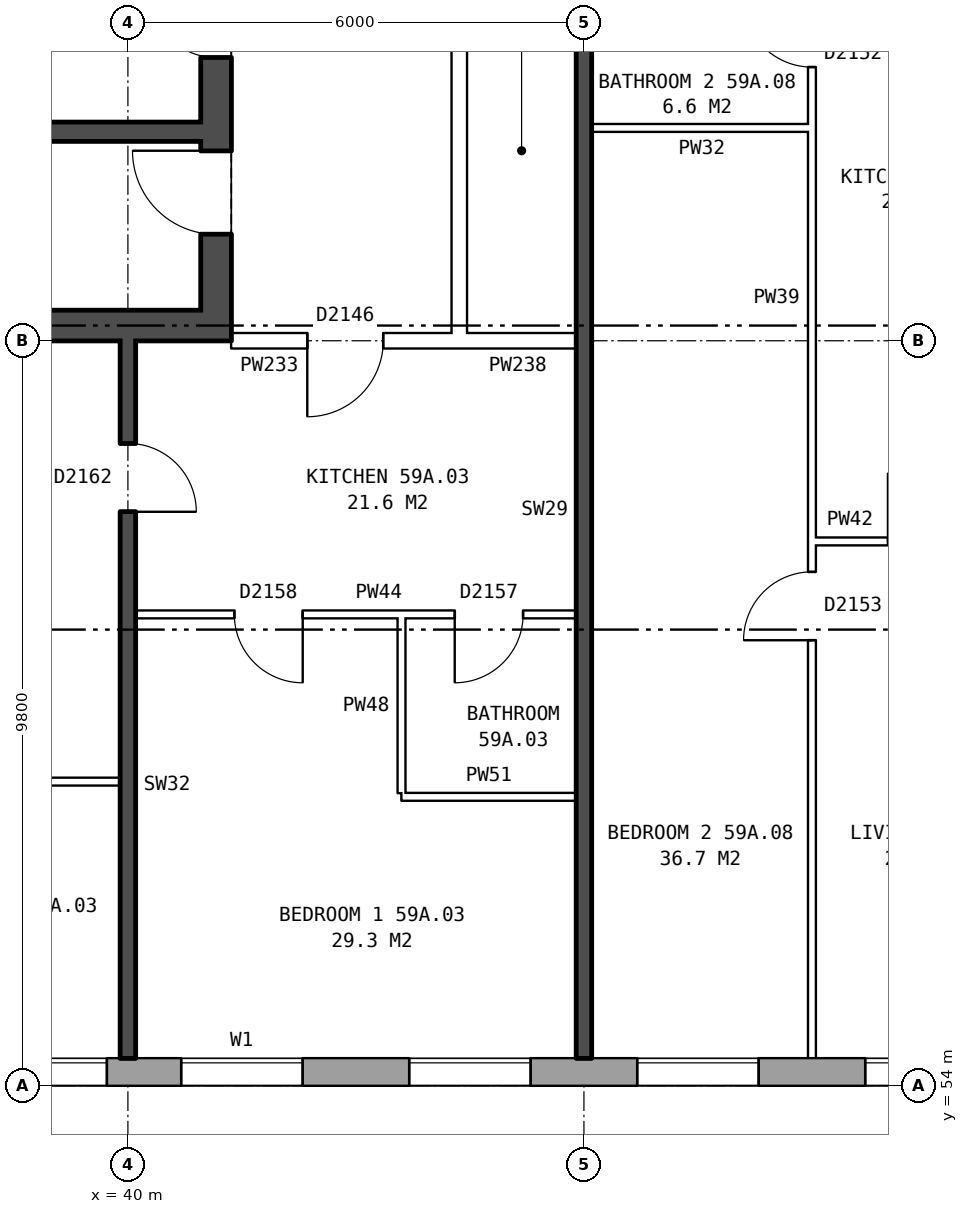
"""IFC4 building model, lengths in metres.
Left out: names, types, materials, properties, quantities, classifications, styles, units other than length and angle.
Written with IfcOpenShell. Run it as: python <this file> out.ifc"""

import sys

from ifc_helpers import new_model, si_unit, direction, frame, frame_2d, origin, place, context, subcontext, project, spatial, rectangle, extrude, element, fill, save


model = new_model("IFC4")
c1 = context("Model", 3, precision=1e-05, world=origin(), true_north=direction((0.0, 1.0)))
c2 = subcontext(c1, "Body", "Model", "MODEL_VIEW")
j1 = project(units=[si_unit("LENGTHUNIT", "METRE"), si_unit("PLANEANGLEUNIT", "RADIAN")], contexts=[c1])
p1 = place(None, origin())
s1 = spatial("IfcSite", under=j1, at=p1, CompositionType="ELEMENT")
p2 = place(p1, origin())
s2 = spatial("IfcBuilding", under=s1, at=p2, CompositionType="ELEMENT")
p3 = place(p2, frame((0.0, 0.0, 209.0)))
s3 = spatial("IfcBuildingStorey", under=s2, at=p3, CompositionType="ELEMENT", Elevation=209.0)
p4 = place(p3, frame((35.075, 54.18, 0.0), z_axis=(0.0, 0.0, 1.0), x_axis=(1.0, 0.0, 0.0)))
e1 = element("IfcWall", 1, at=p4, inside=s3, PredefinedType="STANDARD", context=c2, shape_type="SweptSolid", body=[
    extrude(rectangle(XDim=39.875, YDim=0.36, at=frame_2d((19.938, 0.0))), origin(), (0.0, 0.0, 1.0), 2.85),
])
p5 = place(p4, frame((0.3, 0.0, 0.8)))
e2 = element("IfcOpeningElement", 2, at=p5, cuts=e1, PredefinedType="OPENING", context=c2, shape_type="SweptSolid", body=[
    extrude(rectangle(XDim=1.0, YDim=1.8, at=frame_2d((0.5, 0.9))), frame((0.0, 0.19, 0.0), z_axis=(0.0, -1.0, 0.0), x_axis=(1.0, 0.0, 0.0)), (0.0, 0.0, 1.0), 0.38),
])
p6 = place(p4, frame((5.625, 0.0, 0.8)))
e3 = element("IfcOpeningElement", 3, at=p6, cuts=e1, PredefinedType="OPENING", context=c2, shape_type="SweptSolid", body=[
    extrude(rectangle(XDim=1.6, YDim=1.8, at=frame_2d((0.8, 0.9))), frame((0.0, 0.19, 0.0), z_axis=(0.0, -1.0, 0.0), x_axis=(1.0, 0.0, 0.0)), (0.0, 0.0, 1.0), 0.38),
])
p7 = place(p4, frame((8.625, 0.0, 0.8)))
e4 = element("IfcOpeningElement", 4, at=p7, cuts=e1, PredefinedType="OPENING", context=c2, shape_type="SweptSolid", body=[
    extrude(rectangle(XDim=1.6, YDim=1.8, at=frame_2d((0.8, 0.9))), frame((0.0, 0.19, 0.0), z_axis=(0.0, -1.0, 0.0), x_axis=(1.0, 0.0, 0.0)), (0.0, 0.0, 1.0), 0.38),
])
p8 = place(p4, frame((11.625, 0.0, 0.8)))
e5 = element("IfcOpeningElement", 5, at=p8, cuts=e1, PredefinedType="OPENING", context=c2, shape_type="SweptSolid", body=[
    extrude(rectangle(XDim=1.6, YDim=1.8, at=frame_2d((0.8, 0.9))), frame((0.0, 0.19, 0.0), z_axis=(0.0, -1.0, 0.0), x_axis=(1.0, 0.0, 0.0)), (0.0, 0.0, 1.0), 0.38),
])
p9 = place(p4, frame((14.625, 0.0, 0.8)))
e6 = element("IfcOpeningElement", 6, at=p9, cuts=e1, PredefinedType="OPENING", context=c2, shape_type="SweptSolid", body=[
    extrude(rectangle(XDim=1.6, YDim=1.8, at=frame_2d((0.8, 0.9))), frame((0.0, 0.19, 0.0), z_axis=(0.0, -1.0, 0.0), x_axis=(1.0, 0.0, 0.0)), (0.0, 0.0, 1.0), 0.38),
])
p10 = place(p4, frame((17.625, 0.0, 0.8)))
e7 = element("IfcOpeningElement", 7, at=p10, cuts=e1, PredefinedType="OPENING", context=c2, shape_type="SweptSolid", body=[
    extrude(rectangle(XDim=1.6, YDim=1.8, at=frame_2d((0.8, 0.9))), frame((0.0, 0.19, 0.0), z_axis=(0.0, -1.0, 0.0), x_axis=(1.0, 0.0, 0.0)), (0.0, 0.0, 1.0), 0.38),
])
p11 = place(p4, frame((20.625, 0.0, 0.8)))
e8 = element("IfcOpeningElement", 8, at=p11, cuts=e1, PredefinedType="OPENING", context=c2, shape_type="SweptSolid", body=[
    extrude(rectangle(XDim=1.6, YDim=1.8, at=frame_2d((0.8, 0.9))), frame((0.0, 0.19, 0.0), z_axis=(0.0, -1.0, 0.0), x_axis=(1.0, 0.0, 0.0)), (0.0, 0.0, 1.0), 0.38),
])
p12 = place(p4, frame((23.625, 0.0, 0.8)))
e9 = element("IfcOpeningElement", 9, at=p12, cuts=e1, PredefinedType="OPENING", context=c2, shape_type="SweptSolid", body=[
    extrude(rectangle(XDim=1.6, YDim=1.8, at=frame_2d((0.8, 0.9))), frame((0.0, 0.19, 0.0), z_axis=(0.0, -1.0, 0.0), x_axis=(1.0, 0.0, 0.0)), (0.0, 0.0, 1.0), 0.38),
])
p13 = place(p4, frame((26.625, 0.0, 0.8)))
e10 = element("IfcOpeningElement", 10, at=p13, cuts=e1, PredefinedType="OPENING", context=c2, shape_type="SweptSolid", body=[
    extrude(rectangle(XDim=1.6, YDim=1.8, at=frame_2d((0.8, 0.9))), frame((0.0, 0.19, 0.0), z_axis=(0.0, -1.0, 0.0), x_axis=(1.0, 0.0, 0.0)), (0.0, 0.0, 1.0), 0.38),
])
p14 = place(p4, frame((29.625, 0.0, 0.8)))
e11 = element("IfcOpeningElement", 11, at=p14, cuts=e1, PredefinedType="OPENING", context=c2, shape_type="SweptSolid", body=[
    extrude(rectangle(XDim=1.6, YDim=1.8, at=frame_2d((0.8, 0.9))), frame((0.0, 0.19, 0.0), z_axis=(0.0, -1.0, 0.0), x_axis=(1.0, 0.0, 0.0)), (0.0, 0.0, 1.0), 0.38),
])
p15 = place(p4, frame((32.625, 0.0, 0.8)))
e12 = element("IfcOpeningElement", 12, at=p15, cuts=e1, PredefinedType="OPENING", context=c2, shape_type="SweptSolid", body=[
    extrude(rectangle(XDim=1.6, YDim=1.8, at=frame_2d((0.8, 0.9))), frame((0.0, 0.19, 0.0), z_axis=(0.0, -1.0, 0.0), x_axis=(1.0, 0.0, 0.0)), (0.0, 0.0, 1.0), 0.38),
])
p16 = place(p4, frame((36.325, 0.0, 1.1)))
e13 = element("IfcOpeningElement", 13, at=p16, cuts=e1, PredefinedType="OPENING", context=c2, shape_type="SweptSolid", body=[
    extrude(rectangle(XDim=0.8, YDim=1.5, at=frame_2d((0.4, 0.75))), frame((0.0, 0.19, 0.0), z_axis=(0.0, -1.0, 0.0), x_axis=(1.0, 0.0, 0.0)), (0.0, 0.0, 1.0), 0.38),
])
p17 = place(p4, frame((3.65, 0.0, 0.8)))
e14 = element("IfcOpeningElement", 14, at=p17, cuts=e1, PredefinedType="OPENING", context=c2, shape_type="SweptSolid", body=[
    extrude(rectangle(XDim=1.0, YDim=1.8, at=frame_2d((0.5, 0.9))), frame((0.0, 0.19, 0.0), z_axis=(0.0, -1.0, 0.0), x_axis=(1.0, 0.0, 0.0)), (0.0, 0.0, 1.0), 0.38),
])
p18 = place(p4, frame((37.425, 0.0, 0.8)))
e15 = element("IfcOpeningElement", 15, at=p18, cuts=e1, PredefinedType="OPENING", context=c2, shape_type="SweptSolid", body=[
    extrude(rectangle(XDim=1.4, YDim=1.8, at=frame_2d((0.7, 0.9))), frame((0.0, 0.19, 0.0), z_axis=(0.0, -1.0, 0.0), x_axis=(1.0, 0.0, 0.0)), (0.0, 0.0, 1.0), 0.38),
])
p19 = place(p3, frame((41.16, 76.2, 0.0), z_axis=(0.0, 0.0, 1.0), x_axis=(0.0, -1.0, 0.0)))
e16 = element("IfcWall", 16, at=p19, inside=s3, PredefinedType="SHEAR", context=c2, shape_type="SweptSolid", body=[
    extrude(rectangle(XDim=12.4, YDim=0.4, at=frame_2d((6.2, 0.0))), origin(), (0.0, 0.0, 1.0), 2.85),
])
p20 = place(p19, frame((1.325, 0.0, 0.0)))
e17 = element("IfcOpeningElement", 17, at=p20, cuts=e16, PredefinedType="OPENING", context=c2, shape_type="SweptSolid", body=[
    extrude(rectangle(XDim=1.1, YDim=2.1, at=frame_2d((0.55, 1.05))), frame((0.0, 0.21, 0.0), z_axis=(0.0, -1.0, 0.0), x_axis=(1.0, 0.0, 0.0)), (0.0, 0.0, 1.0), 0.42),
])
p21 = place(p19, frame((4.575, 0.0, 0.0)))
e18 = element("IfcOpeningElement", 18, at=p21, cuts=e16, PredefinedType="OPENING", context=c2, shape_type="SweptSolid", body=[
    extrude(rectangle(XDim=0.85, YDim=2.1, at=frame_2d((0.425, 1.05))), frame((0.0, 0.21, 0.0), z_axis=(0.0, -1.0, 0.0), x_axis=(1.0, 0.0, 0.0)), (0.0, 0.0, 1.0), 0.42),
])
p22 = place(p19, frame((7.825, 0.0, 0.0)))
e19 = element("IfcOpeningElement", 19, at=p22, cuts=e16, PredefinedType="OPENING", context=c2, shape_type="SweptSolid", body=[
    extrude(rectangle(XDim=0.85, YDim=2.1, at=frame_2d((0.425, 1.05))), frame((0.0, 0.21, 0.0), z_axis=(0.0, -1.0, 0.0), x_axis=(1.0, 0.0, 0.0)), (0.0, 0.0, 1.0), 0.42),
])
p23 = place(p19, frame((9.9, 0.0, 0.0)))
e20 = element("IfcOpeningElement", 20, at=p23, cuts=e16, PredefinedType="OPENING", context=c2, shape_type="SweptSolid", body=[
    extrude(rectangle(XDim=1.1, YDim=2.1, at=frame_2d((0.55, 1.05))), frame((0.0, 0.21, 0.0), z_axis=(0.0, -1.0, 0.0), x_axis=(1.0, 0.0, 0.0)), (0.0, 0.0, 1.0), 0.42),
])
p24 = place(p3, frame((40.96, 64.0, 0.0), z_axis=(0.0, 0.0, 1.0), x_axis=(-1.0, 0.0, 0.0)))
e21 = element("IfcWall", 21, at=p24, inside=s3, PredefinedType="SHEAR", context=c2, shape_type="SweptSolid", body=[
    extrude(rectangle(XDim=8.2, YDim=0.4, at=frame_2d((4.1, 0.0))), origin(), (0.0, 0.0, 1.0), 2.85),
])
p25 = place(p3, frame((40.96, 66.55, 0.0), z_axis=(0.0, 0.0, 1.0), x_axis=(-1.0, 0.0, 0.0)))
e22 = element("IfcWall", 22, at=p25, inside=s3, PredefinedType="SHEAR", context=c2, shape_type="SweptSolid", body=[
    extrude(rectangle(XDim=2.525, YDim=0.25, at=frame_2d((1.262, 0.0))), origin(), (0.0, 0.0, 1.0), 2.85),
])
p26 = place(p3, frame((44.36, 63.9, 0.0), z_axis=(0.0, 0.0, 1.0), x_axis=(0.0, 1.0, 0.0)))
e23 = element("IfcWall", 23, at=p26, inside=s3, PredefinedType="PARTITIONING", context=c2, shape_type="SweptSolid", body=[
    extrude(rectangle(XDim=12.2, YDim=0.2, at=frame_2d((6.1, 0.0))), origin(), (0.0, 0.0, 1.0), 2.85),
])
p27 = place(p26, frame((5.1, 0.0, 0.0)))
e24 = element("IfcOpeningElement", 24, at=p27, cuts=e23, PredefinedType="OPENING", context=c2, shape_type="SweptSolid", body=[
    extrude(rectangle(XDim=2.0, YDim=2.1, at=frame_2d((1.0, 1.05))), frame((0.0, 0.11, 0.0), z_axis=(0.0, -1.0, 0.0), x_axis=(1.0, 0.0, 0.0)), (0.0, 0.0, 1.0), 0.22),
])
p28 = place(p3, frame((43.6, 57.8, 0.0), z_axis=(0.0, 0.0, 1.0), x_axis=(1.0, 0.0, 0.0)))
e25 = element("IfcWall", 25, at=p28, inside=s3, PredefinedType="PARTITIONING", context=c2, shape_type="SweptSolid", body=[
    extrude(rectangle(XDim=2.3, YDim=0.1, at=frame_2d((1.15, 0.0))), origin(), (0.0, 0.0, 1.0), 2.85),
])
p29 = place(p3, frame((32.36, 58.0, 0.0), z_axis=(0.0, 0.0, 1.0), x_axis=(1.0, 0.0, 0.0)))
e26 = element("IfcWall", 26, at=p29, inside=s3, PredefinedType="PARTITIONING", context=c2, shape_type="SweptSolid", body=[
    extrude(rectangle(XDim=7.54, YDim=0.1, at=frame_2d((3.77, 0.0))), origin(), (0.0, 0.0, 1.0), 2.85),
])
p30 = place(p29, frame((3.32, 0.0, 0.0)))
e27 = element("IfcOpeningElement", 27, at=p30, cuts=e26, PredefinedType="OPENING", context=c2, shape_type="SweptSolid", body=[
    extrude(rectangle(XDim=0.9, YDim=2.1, at=frame_2d((0.45, 1.05))), frame((0.0, 0.06, 0.0), z_axis=(0.0, -1.0, 0.0), x_axis=(1.0, 0.0, 0.0)), (0.0, 0.0, 1.0), 0.12),
])
p31 = place(p3, frame((40.1, 60.2, 0.0), z_axis=(0.0, 0.0, 1.0), x_axis=(1.0, 0.0, 0.0)))
e28 = element("IfcWall", 28, at=p31, inside=s3, PredefinedType="PARTITIONING", context=c2, shape_type="SweptSolid", body=[
    extrude(rectangle(XDim=5.8, YDim=0.1, at=frame_2d((2.9, 0.0))), origin(), (0.0, 0.0, 1.0), 2.85),
])
p32 = place(p31, frame((1.3, 0.0, 0.0)))
e29 = element("IfcOpeningElement", 29, at=p32, cuts=e28, PredefinedType="OPENING", context=c2, shape_type="SweptSolid", body=[
    extrude(rectangle(XDim=0.9, YDim=2.1, at=frame_2d((0.45, 1.05))), frame((0.0, 0.06, 0.0), z_axis=(0.0, -1.0, 0.0), x_axis=(1.0, 0.0, 0.0)), (0.0, 0.0, 1.0), 0.12),
])
p33 = place(p31, frame((4.2, 0.0, 0.0)))
e30 = element("IfcOpeningElement", 30, at=p33, cuts=e28, PredefinedType="OPENING", context=c2, shape_type="SweptSolid", body=[
    extrude(rectangle(XDim=0.9, YDim=2.1, at=frame_2d((0.45, 1.05))), frame((0.0, 0.06, 0.0), z_axis=(0.0, -1.0, 0.0), x_axis=(1.0, 0.0, 0.0)), (0.0, 0.0, 1.0), 0.12),
])
p34 = place(p3, frame((49.0, 61.16, 0.0), z_axis=(0.0, 0.0, 1.0), x_axis=(1.0, 0.0, 0.0)))
e31 = element("IfcWall", 31, at=p34, inside=s3, PredefinedType="PARTITIONING", context=c2, shape_type="SweptSolid", body=[
    extrude(rectangle(XDim=2.9, YDim=0.1, at=frame_2d((1.45, 0.0))), origin(), (0.0, 0.0, 1.0), 2.85),
])
p35 = place(p34, frame((1.0, 0.0, 0.0)))
e32 = element("IfcOpeningElement", 32, at=p35, cuts=e31, PredefinedType="OPENING", context=c2, shape_type="SweptSolid", body=[
    extrude(rectangle(XDim=0.9, YDim=2.1, at=frame_2d((0.45, 1.05))), frame((0.0, 0.06, 0.0), z_axis=(0.0, -1.0, 0.0), x_axis=(1.0, 0.0, 0.0)), (0.0, 0.0, 1.0), 0.12),
])
p36 = place(p3, frame((41.36, 63.8, 0.0), z_axis=(0.0, 0.0, 1.0), x_axis=(1.0, 0.0, 0.0)))
e33 = element("IfcWall", 33, at=p36, inside=s3, PredefinedType="PARTITIONING", context=c2, shape_type="SweptSolid", body=[
    extrude(rectangle(XDim=3.0, YDim=0.2, at=frame_2d((1.5, 0.0))), origin(), (0.0, 0.0, 1.0), 2.85),
])
p37 = place(p36, frame((1.0, 0.0, 0.0)))
e34 = element("IfcOpeningElement", 34, at=p37, cuts=e33, PredefinedType="OPENING", context=c2, shape_type="SweptSolid", body=[
    extrude(rectangle(XDim=1.0, YDim=2.1, at=frame_2d((0.5, 1.05))), frame((0.0, 0.11, 0.0), z_axis=(0.0, -1.0, 0.0), x_axis=(1.0, 0.0, 0.0)), (0.0, 0.0, 1.0), 0.22),
])
p38 = place(p3, frame((44.36, 63.8, 0.0), z_axis=(0.0, 0.0, 1.0), x_axis=(1.0, 0.0, 0.0)))
e35 = element("IfcWall", 35, at=p38, inside=s3, PredefinedType="PARTITIONING", context=c2, shape_type="SweptSolid", body=[
    extrude(rectangle(XDim=1.54, YDim=0.2, at=frame_2d((0.77, 0.0))), origin(), (0.0, 0.0, 1.0), 2.85),
])
p39 = place(p3, frame((46.1, 66.6, 0.0), z_axis=(0.0, 0.0, 1.0), x_axis=(1.0, 0.0, 0.0)))
e36 = element("IfcWall", 36, at=p39, inside=s3, PredefinedType="PARTITIONING", context=c2, shape_type="SweptSolid", body=[
    extrude(rectangle(XDim=2.9, YDim=0.1, at=frame_2d((1.45, 0.0))), origin(), (0.0, 0.0, 1.0), 2.85),
])
p40 = place(p3, frame((40.0, 54.36, 0.0), z_axis=(0.0, 0.0, 1.0), x_axis=(0.0, 1.0, 0.0)))
e37 = element("IfcWall", 37, at=p40, inside=s3, PredefinedType="SOLIDWALL", context=c2, shape_type="SweptSolid", body=[
    extrude(rectangle(XDim=9.44, YDim=0.2, at=frame_2d((4.72, 0.0))), origin(), (0.0, 0.0, 1.0), 2.85),
])
p41 = place(p40, frame((7.19, 0.0, 0.0)))
e38 = element("IfcOpeningElement", 38, at=p41, cuts=e37, PredefinedType="OPENING", context=c2, shape_type="SweptSolid", body=[
    extrude(rectangle(XDim=0.9, YDim=2.1, at=frame_2d((0.45, 1.05))), frame((0.0, 0.11, 0.0), z_axis=(0.0, -1.0, 0.0), x_axis=(1.0, 0.0, 0.0)), (0.0, 0.0, 1.0), 0.22),
])
p42 = place(p3, frame((43.6, 57.85, 0.0), z_axis=(0.0, 0.0, 1.0), x_axis=(0.0, 1.0, 0.0)))
e39 = element("IfcWall", 39, at=p42, inside=s3, PredefinedType="PARTITIONING", context=c2, shape_type="SweptSolid", body=[
    extrude(rectangle(XDim=2.3, YDim=0.1, at=frame_2d((1.15, 0.0))), origin(), (0.0, 0.0, 1.0), 2.85),
])
p43 = place(p3, frame((46.0, 54.36, 0.0), z_axis=(0.0, 0.0, 1.0), x_axis=(0.0, 1.0, 0.0)))
e40 = element("IfcWall", 40, at=p43, inside=s3, PredefinedType="SOLIDWALL", context=c2, shape_type="SweptSolid", body=[
    extrude(rectangle(XDim=14.44, YDim=0.2, at=frame_2d((7.22, 0.0))), origin(), (0.0, 0.0, 1.0), 2.85),
])
p44 = place(p3, frame((49.0, 54.36, 0.0), z_axis=(0.0, 0.0, 1.0), x_axis=(0.0, 1.0, 0.0)))
e41 = element("IfcWall", 41, at=p44, inside=s3, PredefinedType="PARTITIONING", context=c2, shape_type="SweptSolid", body=[
    extrude(rectangle(XDim=14.34, YDim=0.1, at=frame_2d((7.17, 0.0))), origin(), (0.0, 0.0, 1.0), 2.85),
])
p45 = place(p44, frame((5.5, 0.0, 0.0)))
e42 = element("IfcOpeningElement", 42, at=p45, cuts=e41, PredefinedType="OPENING", context=c2, shape_type="SweptSolid", body=[
    extrude(rectangle(XDim=0.9, YDim=2.1, at=frame_2d((0.45, 1.05))), frame((0.0, 0.06, 0.0), z_axis=(0.0, -1.0, 0.0), x_axis=(1.0, 0.0, 0.0)), (0.0, 0.0, 1.0), 0.12),
])
p46 = place(p44, frame((13.04, 0.0, 0.0)))
e43 = element("IfcOpeningElement", 43, at=p46, cuts=e41, PredefinedType="OPENING", context=c2, shape_type="SweptSolid", body=[
    extrude(rectangle(XDim=0.9, YDim=2.1, at=frame_2d((0.45, 1.05))), frame((0.0, 0.06, 0.0), z_axis=(0.0, -1.0, 0.0), x_axis=(1.0, 0.0, 0.0)), (0.0, 0.0, 1.0), 0.12),
])
p47 = place(p6, origin())
e44 = element("IfcWindow", 44, at=p47, inside=s3, PartitioningType="SINGLE_PANEL", PredefinedType="WINDOW", context=c2, shape_type="SweptSolid", body=[
    extrude(rectangle(XDim=1.6, YDim=1.8, at=frame_2d((0.8, 0.9))), frame((0.0, 0.15, 0.0), z_axis=(0.0, -1.0, 0.0), x_axis=(1.0, 0.0, 0.0)), (0.0, 0.0, 1.0), 0.06),
])
fill(e3, e44)
p48 = place(p7, origin())
e45 = element("IfcWindow", 45, at=p48, inside=s3, PartitioningType="SINGLE_PANEL", PredefinedType="WINDOW", context=c2, shape_type="SweptSolid", body=[
    extrude(rectangle(XDim=1.6, YDim=1.8, at=frame_2d((0.8, 0.9))), frame((0.0, 0.15, 0.0), z_axis=(0.0, -1.0, 0.0), x_axis=(1.0, 0.0, 0.0)), (0.0, 0.0, 1.0), 0.06),
])
fill(e4, e45)
p49 = place(p8, origin())
e46 = element("IfcWindow", 46, at=p49, inside=s3, PartitioningType="SINGLE_PANEL", PredefinedType="WINDOW", context=c2, shape_type="SweptSolid", body=[
    extrude(rectangle(XDim=1.6, YDim=1.8, at=frame_2d((0.8, 0.9))), frame((0.0, 0.15, 0.0), z_axis=(0.0, -1.0, 0.0), x_axis=(1.0, 0.0, 0.0)), (0.0, 0.0, 1.0), 0.06),
])
fill(e5, e46)
p50 = place(p9, origin())
e47 = element("IfcWindow", 47, at=p50, inside=s3, PartitioningType="SINGLE_PANEL", PredefinedType="WINDOW", context=c2, shape_type="SweptSolid", body=[
    extrude(rectangle(XDim=1.6, YDim=1.8, at=frame_2d((0.8, 0.9))), frame((0.0, 0.15, 0.0), z_axis=(0.0, -1.0, 0.0), x_axis=(1.0, 0.0, 0.0)), (0.0, 0.0, 1.0), 0.06),
])
fill(e6, e47)
p51 = place(p22, frame((0.85, 0.0, 0.0), z_axis=(0.0, 0.0, 1.0), x_axis=(-1.0, 0.0, 0.0)))
e48 = element("IfcDoor", 48, at=p51, inside=s3, OperationType="SINGLE_SWING_RIGHT", PredefinedType="DOOR", context=c2, shape_type="SweptSolid", body=[
    extrude(rectangle(XDim=0.85, YDim=2.1, at=frame_2d((0.425, 1.05))), frame((0.0, 0.185, 0.0), z_axis=(0.0, -1.0, 0.0), x_axis=(1.0, 0.0, 0.0)), (0.0, 0.0, 1.0), 0.05),
])
fill(e19, e48)
p52 = place(p23, frame((1.1, 0.0, 0.0), z_axis=(0.0, 0.0, 1.0), x_axis=(-1.0, 0.0, 0.0)))
e49 = element("IfcDoor", 49, at=p52, inside=s3, OperationType="SINGLE_SWING_RIGHT", PredefinedType="DOOR", context=c2, shape_type="SweptSolid", body=[
    extrude(rectangle(XDim=1.1, YDim=2.1, at=frame_2d((0.55, 1.05))), frame((0.0, 0.185, 0.0), z_axis=(0.0, -1.0, 0.0), x_axis=(1.0, 0.0, 0.0)), (0.0, 0.0, 1.0), 0.05),
])
fill(e20, e49)
p53 = place(p32, frame((0.9, 0.0, 0.0), z_axis=(0.0, 0.0, 1.0), x_axis=(-1.0, 0.0, 0.0)))
e50 = element("IfcDoor", 50, at=p53, inside=s3, OperationType="SINGLE_SWING_LEFT", PredefinedType="DOOR", context=c2, shape_type="SweptSolid", body=[
    extrude(rectangle(XDim=0.9, YDim=2.1, at=frame_2d((0.45, 1.05))), frame((0.0, 0.025, 0.0), z_axis=(0.0, -1.0, 0.0), x_axis=(1.0, 0.0, 0.0)), (0.0, 0.0, 1.0), 0.05),
])
fill(e29, e50)
p54 = place(p37, frame((1.0, 0.0, 0.0), z_axis=(0.0, 0.0, 1.0), x_axis=(-1.0, 0.0, 0.0)))
e51 = element("IfcDoor", 51, at=p54, inside=s3, OperationType="SINGLE_SWING_RIGHT", PredefinedType="DOOR", context=c2, shape_type="SweptSolid", body=[
    extrude(rectangle(XDim=1.0, YDim=2.1, at=frame_2d((0.5, 1.05))), frame((0.0, 0.025, 0.0), z_axis=(0.0, -1.0, 0.0), x_axis=(1.0, 0.0, 0.0)), (0.0, 0.0, 1.0), 0.05),
])
fill(e34, e51)
p55 = place(p41, frame((0.9, 0.0, 0.0), z_axis=(0.0, 0.0, 1.0), x_axis=(-1.0, 0.0, 0.0)))
e52 = element("IfcDoor", 52, at=p55, inside=s3, OperationType="SINGLE_SWING_RIGHT", PredefinedType="DOOR", context=c2, shape_type="SweptSolid", body=[
    extrude(rectangle(XDim=0.9, YDim=2.1, at=frame_2d((0.45, 1.05))), frame((0.0, 0.025, 0.0), z_axis=(0.0, -1.0, 0.0), x_axis=(1.0, 0.0, 0.0)), (0.0, 0.0, 1.0), 0.05),
])
fill(e38, e52)
p56 = place(p33, frame((0.9, 0.0, 0.0), z_axis=(0.0, 0.0, 1.0), x_axis=(-1.0, 0.0, 0.0)))
e53 = element("IfcDoor", 53, at=p56, inside=s3, OperationType="SINGLE_SWING_RIGHT", PredefinedType="DOOR", context=c2, shape_type="SweptSolid", body=[
    extrude(rectangle(XDim=0.9, YDim=2.1, at=frame_2d((0.45, 1.05))), frame((0.0, 0.025, 0.0), z_axis=(0.0, -1.0, 0.0), x_axis=(1.0, 0.0, 0.0)), (0.0, 0.0, 1.0), 0.05),
])
fill(e30, e53)
p57 = place(p45, origin())
e54 = element("IfcDoor", 54, at=p57, inside=s3, OperationType="SINGLE_SWING_LEFT", PredefinedType="DOOR", context=c2, shape_type="SweptSolid", body=[
    extrude(rectangle(XDim=0.9, YDim=2.1, at=frame_2d((0.45, 1.05))), frame((0.0, 0.025, 0.0), z_axis=(0.0, -1.0, 0.0), x_axis=(1.0, 0.0, 0.0)), (0.0, 0.0, 1.0), 0.05),
])
fill(e42, e54)
p58 = place(p46, origin())
e55 = element("IfcDoor", 55, at=p58, inside=s3, OperationType="SINGLE_SWING_RIGHT", PredefinedType="DOOR", context=c2, shape_type="SweptSolid", body=[
    extrude(rectangle(XDim=0.9, YDim=2.1, at=frame_2d((0.45, 1.05))), frame((0.0, 0.025, 0.0), z_axis=(0.0, -1.0, 0.0), x_axis=(1.0, 0.0, 0.0)), (0.0, 0.0, 1.0), 0.05),
])
fill(e43, e55)
p59 = place(p17, origin())
e56 = element("IfcWindow", 56, at=p59, inside=s3, PartitioningType="SINGLE_PANEL", PredefinedType="WINDOW", context=c2, shape_type="SweptSolid", body=[
    extrude(rectangle(XDim=1.0, YDim=1.8, at=frame_2d((0.5, 0.9))), frame((0.0, 0.15, 0.0), z_axis=(0.0, -1.0, 0.0), x_axis=(1.0, 0.0, 0.0)), (0.0, 0.0, 1.0), 0.06),
])
fill(e14, e56)
save(model, sys.argv[1])
